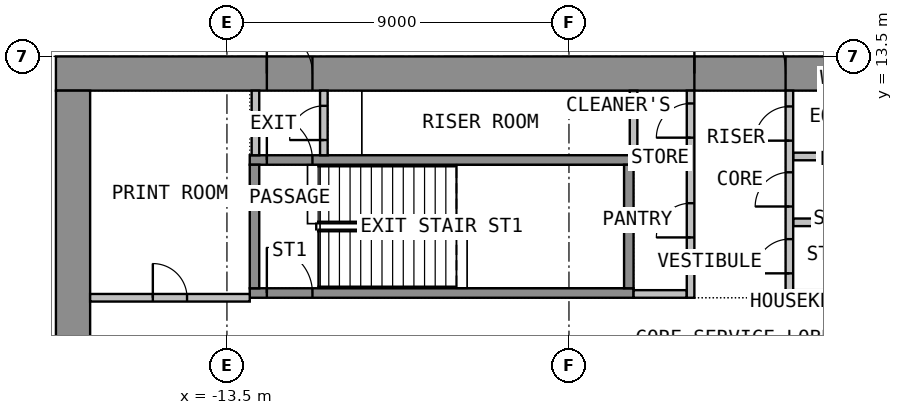
"""IFC4 building model, lengths in metres.
Left out: names, types, materials, properties, quantities, classifications, styles, units other than length and angle.
Written with IfcOpenShell. Run it as: python <this file> out.ifc"""

import sys

from ifc_helpers import new_model, si_unit, direction, frame, frame_2d, origin, place, context, subcontext, project, spatial, rectangle, extrude, element, fill, save


model = new_model("IFC4")
c1 = context("Model", 3, precision=1e-05, world=origin(), true_north=direction((0.0, 1.0)))
c2 = subcontext(c1, "Body", "Model", "MODEL_VIEW")
j1 = project(units=[si_unit("LENGTHUNIT", "METRE"), si_unit("PLANEANGLEUNIT", "RADIAN")], contexts=[c1])
p1 = place(None, origin())
s1 = spatial("IfcSite", under=j1, at=p1, CompositionType="ELEMENT")
p2 = place(p1, origin())
s2 = spatial("IfcBuilding", under=s1, at=p2, CompositionType="ELEMENT")
p3 = place(p2, frame((0.0, 0.0, 15.6)))
s3 = spatial("IfcBuildingStorey", under=s2, at=p3, CompositionType="ELEMENT", Elevation=15.6)
p4 = place(p3, frame((-18.0, 13.05, 0.0), z_axis=(0.0, 0.0, 1.0), x_axis=(1.0, 0.0, 0.0)))
e1 = element("IfcWall", 1, at=p4, inside=s3, PredefinedType="SHEAR", context=c2, shape_type="SweptSolid", body=[
    extrude(rectangle(XDim=36.0, YDim=0.9, at=frame_2d((18.0, 0.0))), origin(), (0.0, 0.0, 1.0), 4.4),
])
p5 = place(p4, frame((16.8, 0.0, 0.0)))
e2 = element("IfcOpeningElement", 2, at=p5, cuts=e1, PredefinedType="OPENING", context=c2, shape_type="SweptSolid", body=[
    extrude(rectangle(XDim=2.4, YDim=2.1, at=frame_2d((1.2, 1.05))), frame((0.0, 0.46, 0.0), z_axis=(0.0, -1.0, 0.0), x_axis=(1.0, 0.0, 0.0)), (0.0, 0.0, 1.0), 0.92),
])
p6 = place(p4, frame((5.55, 0.0, 0.0)))
e3 = element("IfcOpeningElement", 3, at=p6, cuts=e1, PredefinedType="OPENING", context=c2, shape_type="SweptSolid", body=[
    extrude(rectangle(XDim=1.2, YDim=2.1, at=frame_2d((0.6, 1.05))), frame((0.0, 0.46, 0.0), z_axis=(0.0, -1.0, 0.0), x_axis=(1.0, 0.0, 0.0)), (0.0, 0.0, 1.0), 0.92),
])
p7 = place(p4, frame((29.25, 0.0, 0.0)))
e4 = element("IfcOpeningElement", 4, at=p7, cuts=e1, PredefinedType="OPENING", context=c2, shape_type="SweptSolid", body=[
    extrude(rectangle(XDim=1.2, YDim=2.1, at=frame_2d((0.6, 1.05))), frame((0.0, 0.46, 0.0), z_axis=(0.0, -1.0, 0.0), x_axis=(1.0, 0.0, 0.0)), (0.0, 0.0, 1.0), 0.92),
])
p8 = place(p3, frame((-17.55, -12.6, 0.0), z_axis=(0.0, 0.0, 1.0), x_axis=(0.0, 1.0, 0.0)))
e5 = element("IfcWall", 5, at=p8, inside=s3, PredefinedType="SHEAR", context=c2, shape_type="SweptSolid", body=[
    extrude(rectangle(XDim=25.2, YDim=0.9, at=frame_2d((12.6, 0.0))), origin(), (0.0, 0.0, 1.0), 4.4),
])
p9 = place(p8, frame((11.4, 0.0, 0.0)))
e6 = element("IfcOpeningElement", 6, at=p9, cuts=e5, PredefinedType="OPENING", context=c2, shape_type="SweptSolid", body=[
    extrude(rectangle(XDim=2.4, YDim=2.1, at=frame_2d((1.2, 1.05))), frame((0.0, 0.46, 0.0), z_axis=(0.0, -1.0, 0.0), x_axis=(1.0, 0.0, 0.0)), (0.0, 0.0, 1.0), 0.92),
])
p10 = place(p3, frame((-12.9, 7.275, 0.0), z_axis=(0.0, 0.0, 1.0), x_axis=(1.0, 0.0, 0.0)))
e7 = element("IfcWall", 7, at=p10, inside=s3, PredefinedType="SHEAR", context=c2, shape_type="SweptSolid", body=[
    extrude(rectangle(XDim=10.1, YDim=0.25, at=frame_2d((5.05, 0.0))), origin(), (0.0, 0.0, 1.0), 4.4),
])
p11 = place(p10, frame((0.45, 0.0, 0.0)))
e8 = element("IfcOpeningElement", 8, at=p11, cuts=e7, PredefinedType="OPENING", context=c2, shape_type="SweptSolid", body=[
    extrude(rectangle(XDim=1.2, YDim=2.1, at=frame_2d((0.6, 1.05))), frame((0.0, 0.135, 0.0), z_axis=(0.0, -1.0, 0.0), x_axis=(1.0, 0.0, 0.0)), (0.0, 0.0, 1.0), 0.27),
])
p12 = place(p3, frame((-12.9, 10.775, 0.0), z_axis=(0.0, 0.0, 1.0), x_axis=(1.0, 0.0, 0.0)))
e9 = element("IfcWall", 9, at=p12, inside=s3, PredefinedType="SHEAR", context=c2, shape_type="SweptSolid", body=[
    extrude(rectangle(XDim=10.1, YDim=0.25, at=frame_2d((5.05, 0.0))), origin(), (0.0, 0.0, 1.0), 4.4),
])
p13 = place(p12, frame((0.45, 0.0, 0.0)))
e10 = element("IfcOpeningElement", 10, at=p13, cuts=e9, PredefinedType="OPENING", context=c2, shape_type="SweptSolid", body=[
    extrude(rectangle(XDim=1.2, YDim=2.1, at=frame_2d((0.6, 1.05))), frame((0.0, 0.135, 0.0), z_axis=(0.0, -1.0, 0.0), x_axis=(1.0, 0.0, 0.0)), (0.0, 0.0, 1.0), 0.27),
])
for number, where, z_axis, x_axis in (
    (11, (-12.775, 7.4, 0.0), (0.0, 0.0, 1.0), (0.0, 1.0, 0.0)),
    (12, (-2.925, 7.4, 0.0), (0.0, 0.0, 1.0), (0.0, 1.0, 0.0)),
):
    element("IfcWall", number, at=place(p3, frame(where, z_axis=z_axis, x_axis=x_axis)), inside=s3, PredefinedType="SHEAR", context=c2, shape_type="SweptSolid", body=[
        extrude(rectangle(XDim=3.25, YDim=0.25, at=frame_2d((1.625, 0.0))), origin(), (0.0, 0.0, 1.0), 4.4),
    ])
for number, where, z_axis, x_axis in (
    (13, (-2.8, 7.25, 0.0), (0.0, 0.0, 1.0), (1.0, 0.0, 0.0)),
    (14, (-2.8, 11.025, 0.0), (0.0, 0.0, 1.0), (1.0, 0.0, 0.0)),
    (15, (1.4, 7.25, 0.0), (0.0, 0.0, 1.0), (1.0, 0.0, 0.0)),
    (16, (1.4, 9.135, 0.0), (0.0, 0.0, 1.0), (1.0, 0.0, 0.0)),
    (17, (1.4, 10.867, 0.0), (0.0, 0.0, 1.0), (1.0, 0.0, 0.0)),
):
    element("IfcWall", number, at=place(p3, frame(where, z_axis=z_axis, x_axis=x_axis)), inside=s3, PredefinedType="PARTITIONING", context=c2, shape_type="SweptSolid", body=[
        extrude(rectangle(XDim=1.4, YDim=0.2, at=frame_2d((0.7, 0.0))), origin(), (0.0, 0.0, 1.0), 4.4),
    ])
p14 = place(p3, frame((-1.3, 7.15, 0.0), z_axis=(0.0, 0.0, 1.0), x_axis=(0.0, 1.0, 0.0)))
e18 = element("IfcWall", 18, at=p14, inside=s3, PredefinedType="PARTITIONING", context=c2, shape_type="SweptSolid", body=[
    extrude(rectangle(XDim=5.45, YDim=0.2, at=frame_2d((2.725, 0.0))), origin(), (0.0, 0.0, 1.0), 4.4),
])
p15 = place(p14, frame((1.587, 0.0, 0.0)))
e19 = element("IfcOpeningElement", 19, at=p15, cuts=e18, PredefinedType="OPENING", context=c2, shape_type="SweptSolid", body=[
    extrude(rectangle(XDim=0.9, YDim=2.1, at=frame_2d((0.45, 1.05))), frame((0.0, 0.11, 0.0), z_axis=(0.0, -1.0, 0.0), x_axis=(1.0, 0.0, 0.0)), (0.0, 0.0, 1.0), 0.22),
])
p16 = place(p14, frame((4.212, 0.0, 0.0)))
e20 = element("IfcOpeningElement", 20, at=p16, cuts=e18, PredefinedType="OPENING", context=c2, shape_type="SweptSolid", body=[
    extrude(rectangle(XDim=0.9, YDim=2.1, at=frame_2d((0.45, 1.05))), frame((0.0, 0.11, 0.0), z_axis=(0.0, -1.0, 0.0), x_axis=(1.0, 0.0, 0.0)), (0.0, 0.0, 1.0), 0.22),
])
p17 = place(p3, frame((1.3, 7.15, 0.0), z_axis=(0.0, 0.0, 1.0), x_axis=(0.0, 1.0, 0.0)))
e21 = element("IfcWall", 21, at=p17, inside=s3, PredefinedType="PARTITIONING", context=c2, shape_type="SweptSolid", body=[
    extrude(rectangle(XDim=5.45, YDim=0.2, at=frame_2d((2.725, 0.0))), origin(), (0.0, 0.0, 1.0), 4.4),
])
p18 = place(p17, frame((0.643, 0.0, 0.0)))
e22 = element("IfcOpeningElement", 22, at=p18, cuts=e21, PredefinedType="OPENING", context=c2, shape_type="SweptSolid", body=[
    extrude(rectangle(XDim=0.9, YDim=2.1, at=frame_2d((0.45, 1.05))), frame((0.0, 0.11, 0.0), z_axis=(0.0, -1.0, 0.0), x_axis=(1.0, 0.0, 0.0)), (0.0, 0.0, 1.0), 0.22),
])
p19 = place(p17, frame((2.401, 0.0, 0.0)))
e23 = element("IfcOpeningElement", 23, at=p19, cuts=e21, PredefinedType="OPENING", context=c2, shape_type="SweptSolid", body=[
    extrude(rectangle(XDim=0.9, YDim=2.1, at=frame_2d((0.45, 1.05))), frame((0.0, 0.11, 0.0), z_axis=(0.0, -1.0, 0.0), x_axis=(1.0, 0.0, 0.0)), (0.0, 0.0, 1.0), 0.22),
])
p20 = place(p17, frame((4.134, 0.0, 0.0)))
e24 = element("IfcOpeningElement", 24, at=p20, cuts=e21, PredefinedType="OPENING", context=c2, shape_type="SweptSolid", body=[
    extrude(rectangle(XDim=0.9, YDim=2.1, at=frame_2d((0.45, 1.05))), frame((0.0, 0.11, 0.0), z_axis=(0.0, -1.0, 0.0), x_axis=(1.0, 0.0, 0.0)), (0.0, 0.0, 1.0), 0.22),
])
p21 = place(p3, frame((-12.75, 10.9, 0.0), z_axis=(0.0, 0.0, 1.0), x_axis=(0.0, 1.0, 0.0)))
e25 = element("IfcWall", 25, at=p21, inside=s3, PredefinedType="PARTITIONING", context=c2, shape_type="SweptSolid", body=[
    extrude(rectangle(XDim=1.7, YDim=0.2, at=frame_2d((0.85, 0.0))), origin(), (0.0, 0.0, 1.0), 4.4),
])
p22 = place(p3, frame((-10.95, 10.9, 0.0), z_axis=(0.0, 0.0, 1.0), x_axis=(0.0, 1.0, 0.0)))
e26 = element("IfcWall", 26, at=p22, inside=s3, PredefinedType="PARTITIONING", context=c2, shape_type="SweptSolid", body=[
    extrude(rectangle(XDim=1.7, YDim=0.2, at=frame_2d((0.85, 0.0))), origin(), (0.0, 0.0, 1.0), 4.4),
])
p23 = place(p22, frame((0.4, 0.0, 0.0)))
e27 = element("IfcOpeningElement", 27, at=p23, cuts=e26, PredefinedType="OPENING", context=c2, shape_type="SweptSolid", body=[
    extrude(rectangle(XDim=0.9, YDim=2.1, at=frame_2d((0.45, 1.05))), frame((0.0, 0.11, 0.0), z_axis=(0.0, -1.0, 0.0), x_axis=(1.0, 0.0, 0.0)), (0.0, 0.0, 1.0), 0.22),
])
p24 = place(p3, frame((-17.1, 7.15, 0.0), z_axis=(0.0, 0.0, 1.0), x_axis=(1.0, 0.0, 0.0)))
e28 = element("IfcWall", 28, at=p24, inside=s3, PredefinedType="PARTITIONING", context=c2, shape_type="SweptSolid", body=[
    extrude(rectangle(XDim=4.2, YDim=0.2, at=frame_2d((2.1, 0.0))), origin(), (0.0, 0.0, 1.0), 4.4),
])
p25 = place(p24, frame((1.65, 0.0, 0.0)))
e29 = element("IfcOpeningElement", 29, at=p25, cuts=e28, PredefinedType="OPENING", context=c2, shape_type="SweptSolid", body=[
    extrude(rectangle(XDim=0.9, YDim=2.1, at=frame_2d((0.45, 1.05))), frame((0.0, 0.11, 0.0), z_axis=(0.0, -1.0, 0.0), x_axis=(1.0, 0.0, 0.0)), (0.0, 0.0, 1.0), 0.22),
])
p26 = place(p3, frame((-2.8, 11.126, 0.0), z_axis=(0.0, 0.0, 1.0), x_axis=(0.0, 1.0, 0.0)))
e30 = element("IfcWall", 30, at=p26, inside=s3, PredefinedType="PARTITIONING", context=c2, shape_type="SweptSolid", body=[
    extrude(rectangle(XDim=1.473, YDim=0.2, at=frame_2d((0.737, 0.0))), origin(), (0.0, 0.0, 1.0), 4.4),
])
p27 = place(p5, origin())
e31 = element("IfcDoor", 31, at=p27, inside=s3, OperationType="DOUBLE_DOOR_DOUBLE_SWING", PredefinedType="DOOR", context=c2, shape_type="SweptSolid", body=[
    extrude(rectangle(XDim=2.4, YDim=2.1, at=frame_2d((1.2, 1.05))), frame((0.0, 0.025, 0.0), z_axis=(0.0, -1.0, 0.0), x_axis=(1.0, 0.0, 0.0)), (0.0, 0.0, 1.0), 0.05),
])
fill(e2, e31)
p28 = place(p6, origin())
e32 = element("IfcDoor", 32, at=p28, inside=s3, OperationType="SINGLE_SWING_RIGHT", PredefinedType="DOOR", context=c2, shape_type="SweptSolid", body=[
    extrude(rectangle(XDim=1.2, YDim=2.1, at=frame_2d((0.6, 1.05))), frame((0.0, 0.025, 0.0), z_axis=(0.0, -1.0, 0.0), x_axis=(1.0, 0.0, 0.0)), (0.0, 0.0, 1.0), 0.05),
])
fill(e3, e32)
p29 = place(p11, origin())
e33 = element("IfcDoor", 33, at=p29, inside=s3, OperationType="SINGLE_SWING_LEFT", PredefinedType="DOOR", context=c2, shape_type="SweptSolid", body=[
    extrude(rectangle(XDim=1.2, YDim=2.1, at=frame_2d((0.6, 1.05))), frame((0.0, 0.025, 0.0), z_axis=(0.0, -1.0, 0.0), x_axis=(1.0, 0.0, 0.0)), (0.0, 0.0, 1.0), 0.05),
])
fill(e8, e33)
p30 = place(p15, origin())
e34 = element("IfcDoor", 34, at=p30, inside=s3, OperationType="SINGLE_SWING_LEFT", PredefinedType="DOOR", context=c2, shape_type="SweptSolid", body=[
    extrude(rectangle(XDim=0.9, YDim=2.1, at=frame_2d((0.45, 1.05))), frame((0.0, 0.025, 0.0), z_axis=(0.0, -1.0, 0.0), x_axis=(1.0, 0.0, 0.0)), (0.0, 0.0, 1.0), 0.05),
])
fill(e19, e34)
p31 = place(p16, origin())
e35 = element("IfcDoor", 35, at=p31, inside=s3, OperationType="SINGLE_SWING_LEFT", PredefinedType="DOOR", context=c2, shape_type="SweptSolid", body=[
    extrude(rectangle(XDim=0.9, YDim=2.1, at=frame_2d((0.45, 1.05))), frame((0.0, 0.025, 0.0), z_axis=(0.0, -1.0, 0.0), x_axis=(1.0, 0.0, 0.0)), (0.0, 0.0, 1.0), 0.05),
])
fill(e20, e35)
p32 = place(p18, origin())
e36 = element("IfcDoor", 36, at=p32, inside=s3, OperationType="SINGLE_SWING_LEFT", PredefinedType="DOOR", context=c2, shape_type="SweptSolid", body=[
    extrude(rectangle(XDim=0.9, YDim=2.1, at=frame_2d((0.45, 1.05))), frame((0.0, 0.025, 0.0), z_axis=(0.0, -1.0, 0.0), x_axis=(1.0, 0.0, 0.0)), (0.0, 0.0, 1.0), 0.05),
])
fill(e22, e36)
p33 = place(p19, origin())
e37 = element("IfcDoor", 37, at=p33, inside=s3, OperationType="SINGLE_SWING_LEFT", PredefinedType="DOOR", context=c2, shape_type="SweptSolid", body=[
    extrude(rectangle(XDim=0.9, YDim=2.1, at=frame_2d((0.45, 1.05))), frame((0.0, 0.025, 0.0), z_axis=(0.0, -1.0, 0.0), x_axis=(1.0, 0.0, 0.0)), (0.0, 0.0, 1.0), 0.05),
])
fill(e23, e37)
p34 = place(p20, origin())
e38 = element("IfcDoor", 38, at=p34, inside=s3, OperationType="SINGLE_SWING_LEFT", PredefinedType="DOOR", context=c2, shape_type="SweptSolid", body=[
    extrude(rectangle(XDim=0.9, YDim=2.1, at=frame_2d((0.45, 1.05))), frame((0.0, 0.025, 0.0), z_axis=(0.0, -1.0, 0.0), x_axis=(1.0, 0.0, 0.0)), (0.0, 0.0, 1.0), 0.05),
])
fill(e24, e38)
p35 = place(p13, origin())
e39 = element("IfcDoor", 39, at=p35, inside=s3, OperationType="SINGLE_SWING_RIGHT", PredefinedType="DOOR", context=c2, shape_type="SweptSolid", body=[
    extrude(rectangle(XDim=1.2, YDim=2.1, at=frame_2d((0.6, 1.05))), frame((0.0, 0.025, 0.0), z_axis=(0.0, -1.0, 0.0), x_axis=(1.0, 0.0, 0.0)), (0.0, 0.0, 1.0), 0.05),
])
fill(e10, e39)
p36 = place(p23, origin())
e40 = element("IfcDoor", 40, at=p36, inside=s3, OperationType="SINGLE_SWING_LEFT", PredefinedType="DOOR", context=c2, shape_type="SweptSolid", body=[
    extrude(rectangle(XDim=0.9, YDim=2.1, at=frame_2d((0.45, 1.05))), frame((0.0, 0.025, 0.0), z_axis=(0.0, -1.0, 0.0), x_axis=(1.0, 0.0, 0.0)), (0.0, 0.0, 1.0), 0.05),
])
fill(e27, e40)
p37 = place(p25, origin())
e41 = element("IfcDoor", 41, at=p37, inside=s3, OperationType="SINGLE_SWING_LEFT", PredefinedType="DOOR", context=c2, shape_type="SweptSolid", body=[
    extrude(rectangle(XDim=0.9, YDim=2.1, at=frame_2d((0.45, 1.05))), frame((0.0, 0.025, 0.0), z_axis=(0.0, -1.0, 0.0), x_axis=(1.0, 0.0, 0.0)), (0.0, 0.0, 1.0), 0.05),
])
fill(e29, e41)
save(model, sys.argv[1])
